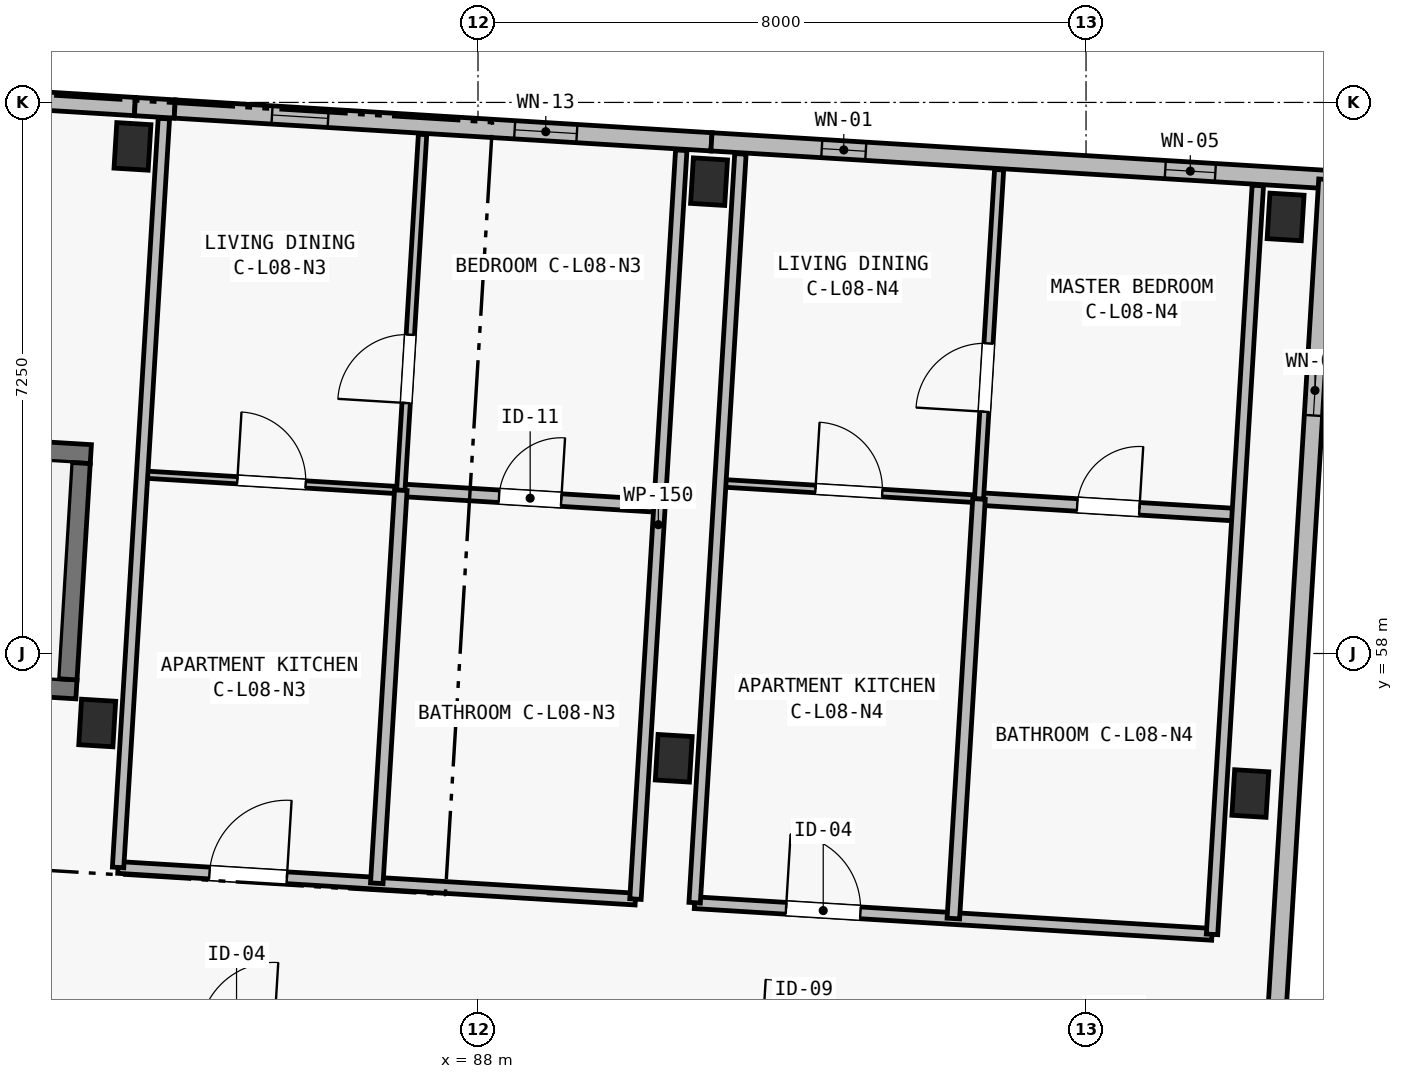
"""IFC4 building model, lengths in metres.
Left out: names, types, materials, properties, quantities, classifications, styles, units other than length and angle.
Written with IfcOpenShell. Run it as: python <this file> out.ifc"""

import sys

from ifc_helpers import new_model, si_unit, direction, frame, frame_2d, origin, origin_2d, place, context, subcontext, project, spatial, polyline, rectangle, outline, extrude, element, fill, save


model = new_model("IFC4")
c1 = context("Model", 3, precision=1e-05, world=origin(), true_north=direction((0.0, 1.0)))
c2 = subcontext(c1, "Body", "Model", "MODEL_VIEW")
j1 = project(units=[si_unit("LENGTHUNIT", "METRE"), si_unit("PLANEANGLEUNIT", "RADIAN")], contexts=[c1])
p1 = place(None, origin())
s1 = spatial("IfcSite", under=j1, at=p1, CompositionType="ELEMENT")
p2 = place(p1, origin())
s2 = spatial("IfcBuilding", under=s1, at=p2, CompositionType="ELEMENT")
p3 = place(p2, frame((0.0, 0.0, 27.9)))
s3 = spatial("IfcBuildingStorey", under=s2, at=p3, CompositionType="ELEMENT", Elevation=27.9)
for number, where, z_axis, x_axis in (
    (1, (82.99, 57.086, 0.0), (0.0, 0.0, 1.0), (0.998, -0.061, 0.0)),
    (2, (83.454, 64.672, 0.0), (0.0, 0.0, 1.0), (0.998, -0.061, 0.0)),
    (3, (90.576, 56.622, 0.0), (0.0, 0.0, 1.0), (0.998, -0.061, 0.0)),
    (4, (91.04, 64.208, 0.0), (0.0, 0.0, 1.0), (0.998, -0.061, 0.0)),
    (5, (98.162, 56.158, 0.0), (0.0, 0.0, 1.0), (0.998, -0.061, 0.0)),
    (6, (98.626, 63.744, 0.0), (0.0, 0.0, 1.0), (0.998, -0.061, 0.0)),
):
    element("IfcColumn", number, at=place(p3, frame(where, z_axis=z_axis, x_axis=x_axis)), inside=s3, PredefinedType="COLUMN", context=c2, shape_type="SweptSolid", body=[
        extrude(rectangle(XDim=0.45, YDim=0.6, at=origin_2d()), origin(), (0.0, 0.0, 1.0), 3.25),
    ])
p4 = place(p3, frame((75.919, 61.05, 0.0), z_axis=(0.0, 0.0, 1.0), x_axis=(0.998135546153, -0.061036313012, 0.0)))
e7 = element("IfcWall", 7, at=p4, inside=s3, PredefinedType="SHEAR", context=c2, shape_type="SweptSolid", body=[
    extrude(rectangle(XDim=7.0, YDim=0.25, at=frame_2d((3.5, 0.0))), origin(), (0.0, 0.0, 1.0), 3.25),
])
p5 = place(p4, frame((0.45, 0.0, 0.0)))
e8 = element("IfcOpeningElement", 8, at=p5, cuts=e7, PredefinedType="OPENING", context=c2, shape_type="SweptSolid", body=[
    extrude(rectangle(XDim=0.9, YDim=2.1, at=frame_2d((0.45, 1.05))), frame((0.0, 0.14, 0.0), z_axis=(0.0, -1.0, 0.0), x_axis=(1.0, 0.0, 0.0)), (0.0, 0.0, 1.0), 0.28),
])
p6 = place(p3, frame((75.73, 57.956, 0.0), z_axis=(0.0, 0.0, 1.0), x_axis=(0.998135546153, -0.061036313012, 0.0)))
e9 = element("IfcWall", 9, at=p6, inside=s3, PredefinedType="SHEAR", context=c2, shape_type="SweptSolid", body=[
    extrude(rectangle(XDim=7.0, YDim=0.25, at=frame_2d((3.5, 0.0))), origin(), (0.0, 0.0, 1.0), 3.25),
])
p7 = place(p6, frame((0.45, 0.0, 0.0)))
e10 = element("IfcOpeningElement", 10, at=p7, cuts=e9, PredefinedType="OPENING", context=c2, shape_type="SweptSolid", body=[
    extrude(rectangle(XDim=1.05, YDim=2.15, at=frame_2d((0.525, 1.075))), frame((0.0, 0.14, 0.0), z_axis=(0.0, -1.0, 0.0), x_axis=(1.0, 0.0, 0.0)), (0.0, 0.0, 1.0), 0.28),
])
p8 = place(p3, frame((82.599, 57.661, 0.0), z_axis=(0.0, 0.0, 1.0), x_axis=(0.06107697143, 0.998133059046, 0.0)))
e11 = element("IfcWall", 11, at=p8, inside=s3, PredefinedType="SHEAR", context=c2, shape_type="SweptSolid", body=[
    extrude(rectangle(XDim=2.85, YDim=0.25, at=frame_2d((1.425, 0.0))), origin(), (0.0, 0.0, 1.0), 3.25),
])
p9 = place(p3, frame((81.115, 65.341, 0.0), z_axis=(0.0, 0.0, 1.0), x_axis=(0.998134103342, -0.061059902923, 0.0)))
e12 = element("IfcWall", 12, at=p9, inside=s3, PredefinedType="SOLIDWALL", context=c2, shape_type="SweptSolid", body=[
    extrude(rectangle(XDim=2.375, YDim=0.24, at=frame_2d((1.188, 0.0))), origin(), (0.0, 0.0, 1.0), 3.0),
])
p10 = place(p3, frame((83.486, 65.196, 0.0), z_axis=(0.0, 0.0, 1.0), x_axis=(0.998142018096, -0.060930384143, 0.0)))
e13 = element("IfcWall", 13, at=p10, inside=s3, PredefinedType="SOLIDWALL", context=c2, shape_type="SweptSolid", body=[
    extrude(rectangle(XDim=0.525, YDim=0.24, at=frame_2d((0.262, 0.0))), origin(), (0.0, 0.0, 1.0), 3.0),
])
p11 = place(p3, frame((84.01, 65.164, 0.0), z_axis=(0.0, 0.0, 1.0), x_axis=(0.998135197798, -0.061042009435, 0.0)))
e14 = element("IfcWall", 14, at=p11, inside=s3, PredefinedType="SOLIDWALL", context=c2, shape_type="SweptSolid", body=[
    extrude(outline(polyline([(0.0, 0.0), (7.075, 0.0), (7.075, 4.861), (0.0, 6.222), (0.0, 0.0)])), frame((0.0, 0.12, 0.0), z_axis=(0.0, -1.0, 0.0), x_axis=(1.0, 0.0, 0.0)), (0.0, 0.0, 1.0), 0.24),
])
p12 = place(p11, frame((1.282, 0.0, 0.5)))
e15 = element("IfcOpeningElement", 15, at=p12, cuts=e14, PredefinedType="OPENING", context=c2, shape_type="SweptSolid", body=[
    extrude(rectangle(XDim=0.74, YDim=2.26, at=frame_2d((0.37, 1.13))), frame((0.0, 0.135, 0.0), z_axis=(0.0, -1.0, 0.0), x_axis=(1.0, 0.0, 0.0)), (0.0, 0.0, 1.0), 0.27),
])
p13 = place(p11, frame((4.481, 0.0, 0.44)))
e16 = element("IfcOpeningElement", 16, at=p13, cuts=e14, PredefinedType="OPENING", context=c2, shape_type="SweptSolid", body=[
    extrude(rectangle(XDim=0.82, YDim=2.18, at=frame_2d((0.41, 1.09))), frame((0.0, 0.135, 0.0), z_axis=(0.0, -1.0, 0.0), x_axis=(1.0, 0.0, 0.0)), (0.0, 0.0, 1.0), 0.27),
])
p14 = place(p3, frame((91.072, 64.732, 0.0), z_axis=(0.0, 0.0, 1.0), x_axis=(0.998134136914, -0.061059354132, 0.0)))
e17 = element("IfcWall", 17, at=p14, inside=s3, PredefinedType="SOLIDWALL", context=c2, shape_type="SweptSolid", body=[
    extrude(outline(polyline([(0.0, 0.0), (8.125, 0.0), (8.125, 3.298), (0.0, 4.861), (0.0, 0.0)])), frame((0.0, 0.12, 0.0), z_axis=(0.0, -1.0, 0.0), x_axis=(1.0, 0.0, 0.0)), (0.0, 0.0, 1.0), 0.24),
])
p15 = place(p14, frame((1.454, 0.0, 0.44)))
e18 = element("IfcOpeningElement", 18, at=p15, cuts=e17, PredefinedType="OPENING", context=c2, shape_type="SweptSolid", body=[
    extrude(rectangle(XDim=0.58, YDim=2.16, at=frame_2d((0.29, 1.08))), frame((0.0, 0.135, 0.0), z_axis=(0.0, -1.0, 0.0), x_axis=(1.0, 0.0, 0.0)), (0.0, 0.0, 1.0), 0.27),
])
p16 = place(p14, frame((5.982, 0.0, 0.5)))
e19 = element("IfcOpeningElement", 19, at=p16, cuts=e17, PredefinedType="OPENING", context=c2, shape_type="SweptSolid", body=[
    extrude(rectangle(XDim=0.66, YDim=2.32, at=frame_2d((0.33, 1.16))), frame((0.0, 0.135, 0.0), z_axis=(0.0, -1.0, 0.0), x_axis=(1.0, 0.0, 0.0)), (0.0, 0.0, 1.0), 0.27),
])
p17 = place(p3, frame((99.182, 64.236, 0.0), z_axis=(0.0, 0.0, 1.0), x_axis=(-0.061040833846, -0.998135269692, 0.0)))
e20 = element("IfcWall", 20, at=p17, inside=s3, PredefinedType="SOLIDWALL", context=c2, shape_type="SweptSolid", body=[
    extrude(rectangle(XDim=20.65, YDim=0.24, at=frame_2d((10.325, 0.0))), origin(), (0.0, 0.0, 1.0), 3.298),
])
p18 = place(p17, frame((2.45, 0.0, 0.45)))
e21 = element("IfcOpeningElement", 21, at=p18, cuts=e20, PredefinedType="OPENING", context=c2, shape_type="SweptSolid", body=[
    extrude(rectangle(XDim=0.66, YDim=2.32, at=frame_2d((0.33, 1.16))), frame((0.0, 0.135, 0.0), z_axis=(0.0, -1.0, 0.0), x_axis=(1.0, 0.0, 0.0)), (0.0, 0.0, 1.0), 0.27),
])
p19 = place(p17, frame((17.4, 0.0, 0.52)))
e22 = element("IfcOpeningElement", 22, at=p19, cuts=e20, PredefinedType="OPENING", context=c2, shape_type="SweptSolid", body=[
    extrude(rectangle(XDim=0.8, YDim=2.3, at=frame_2d((0.4, 1.15))), frame((0.0, 0.135, 0.0), z_axis=(0.0, -1.0, 0.0), x_axis=(1.0, 0.0, 0.0)), (0.0, 0.0, 1.0), 0.27),
])
p20 = place(p3, frame((78.415, 53.378, 0.0), z_axis=(0.0, 0.0, 1.0), x_axis=(0.998132736029, -0.061082250024, 0.0)))
e23 = element("IfcWall", 23, at=p20, inside=s3, PredefinedType="PARTITIONING", context=c2, shape_type="SweptSolid", body=[
    extrude(rectangle(XDim=4.105, YDim=0.155, at=frame_2d((2.052, 0.0))), origin(), (0.0, 0.0, 1.0), 2.97),
])
p21 = place(p20, frame((0.457, 0.0, 0.0)))
e24 = element("IfcOpeningElement", 24, at=p21, cuts=e23, PredefinedType="OPENING", context=c2, shape_type="SweptSolid", body=[
    extrude(rectangle(XDim=1.02, YDim=2.2, at=frame_2d((0.51, 1.1))), frame((0.0, 0.093, 0.0), z_axis=(0.0, -1.0, 0.0), x_axis=(1.0, 0.0, 0.0)), (0.0, 0.0, 1.0), 0.185),
])
p22 = place(p3, frame((83.265, 55.185, 0.0), z_axis=(0.0, 0.0, 1.0), x_axis=(0.998135531673, -0.061036549799, 0.0)))
e25 = element("IfcWall", 25, at=p22, inside=s3, PredefinedType="PARTITIONING", context=c2, shape_type="SweptSolid", body=[
    extrude(rectangle(XDim=6.82, YDim=0.155, at=frame_2d((3.41, 0.0))), origin(), (0.0, 0.0, 1.0), 2.97),
])
p23 = place(p22, frame((1.205, 0.0, 0.0)))
e26 = element("IfcOpeningElement", 26, at=p23, cuts=e25, PredefinedType="OPENING", context=c2, shape_type="SweptSolid", body=[
    extrude(rectangle(XDim=1.02, YDim=2.2, at=frame_2d((0.51, 1.1))), frame((0.0, 0.093, 0.0), z_axis=(0.0, -1.0, 0.0), x_axis=(1.0, 0.0, 0.0)), (0.0, 0.0, 1.0), 0.185),
])
p24 = place(p3, frame((83.581, 60.356, 0.0), z_axis=(0.0, 0.0, 1.0), x_axis=(0.998133350094, -0.061072214879, 0.0)))
e27 = element("IfcWall", 27, at=p24, inside=s3, PredefinedType="PARTITIONING", context=c2, shape_type="SweptSolid", body=[
    extrude(rectangle(XDim=3.41, YDim=0.095, at=frame_2d((1.705, 0.0))), origin(), (0.0, 0.0, 1.0), 2.97),
])
p25 = place(p24, frame((1.255, 0.0, 0.0)))
e28 = element("IfcOpeningElement", 28, at=p25, cuts=e27, PredefinedType="OPENING", context=c2, shape_type="SweptSolid", body=[
    extrude(rectangle(XDim=0.9, YDim=2.1, at=frame_2d((0.45, 1.05))), frame((0.0, 0.062, 0.0), z_axis=(0.0, -1.0, 0.0), x_axis=(1.0, 0.0, 0.0)), (0.0, 0.0, 1.0), 0.125),
])
p26 = place(p3, frame((86.984, 60.147, 0.0), z_axis=(0.0, 0.0, 1.0), x_axis=(0.99813797838, -0.060996525433, 0.0)))
e29 = element("IfcWall", 29, at=p26, inside=s3, PredefinedType="PLUMBINGWALL", context=c2, shape_type="SweptSolid", body=[
    extrude(rectangle(XDim=3.41, YDim=0.165, at=frame_2d((1.705, 0.0))), origin(), (0.0, 0.0, 1.0), 2.97),
])
p27 = place(p26, frame((1.295, 0.0, 0.0)))
e30 = element("IfcOpeningElement", 30, at=p27, cuts=e29, PredefinedType="OPENING", context=c2, shape_type="SweptSolid", body=[
    extrude(rectangle(XDim=0.82, YDim=2.08, at=frame_2d((0.41, 1.04))), frame((0.0, 0.097, 0.0), z_axis=(0.0, -1.0, 0.0), x_axis=(1.0, 0.0, 0.0)), (0.0, 0.0, 1.0), 0.195),
])
p28 = place(p3, frame((86.984, 60.147, 0.0), z_axis=(0.0, 0.0, 1.0), x_axis=(0.061059262019, 0.998134142549, 0.0)))
e31 = element("IfcWall", 31, at=p28, inside=s3, PredefinedType="PARTITIONING", context=c2, shape_type="SweptSolid", body=[
    extrude(rectangle(XDim=4.69, YDim=0.11, at=frame_2d((2.345, 0.0))), origin(), (0.0, 0.0, 1.0), 2.97),
])
p29 = place(p28, frame((1.15, 0.0, 0.0)))
e32 = element("IfcOpeningElement", 32, at=p29, cuts=e31, PredefinedType="OPENING", context=c2, shape_type="SweptSolid", body=[
    extrude(rectangle(XDim=0.9, YDim=2.1, at=frame_2d((0.45, 1.05))), frame((0.0, 0.07, 0.0), z_axis=(0.0, -1.0, 0.0), x_axis=(1.0, 0.0, 0.0)), (0.0, 0.0, 1.0), 0.14),
])
p30 = place(p3, frame((86.668, 54.977, 0.0), z_axis=(0.0, 0.0, 1.0), x_axis=(0.061037231879, 0.998135489963, 0.0)))
e33 = element("IfcWall", 33, at=p30, inside=s3, PredefinedType="PLUMBINGWALL", context=c2, shape_type="SweptSolid", body=[
    extrude(rectangle(XDim=5.18, YDim=0.165, at=frame_2d((2.59, 0.0))), origin(), (0.0, 0.0, 1.0), 2.97),
])
p31 = place(p3, frame((83.265, 55.185, 0.0), z_axis=(0.0, 0.0, 1.0), x_axis=(0.061046193261, 0.998134941923, 0.0)))
e34 = element("IfcWall", 34, at=p31, inside=s3, PredefinedType="PARTITIONING", context=c2, shape_type="SweptSolid", body=[
    extrude(rectangle(XDim=9.87, YDim=0.15, at=frame_2d((4.935, 0.0))), origin(), (0.0, 0.0, 1.0), 2.97),
])
p32 = place(p3, frame((90.072, 54.769, 0.0), z_axis=(0.0, 0.0, 1.0), x_axis=(0.061047700465, 0.998134849741, 0.0)))
e35 = element("IfcWall", 35, at=p32, inside=s3, PredefinedType="PARTITIONING", context=c2, shape_type="SweptSolid", body=[
    extrude(rectangle(XDim=9.87, YDim=0.15, at=frame_2d((4.935, 0.0))), origin(), (0.0, 0.0, 1.0), 2.97),
])
p33 = place(p3, frame((90.85, 54.721, 0.0), z_axis=(0.0, 0.0, 1.0), x_axis=(0.998135665032, -0.06103436893, 0.0)))
e36 = element("IfcWall", 36, at=p33, inside=s3, PredefinedType="PARTITIONING", context=c2, shape_type="SweptSolid", body=[
    extrude(rectangle(XDim=6.82, YDim=0.155, at=frame_2d((3.41, 0.0))), origin(), (0.0, 0.0, 1.0), 3.15),
])
p34 = place(p33, frame((1.205, 0.0, 0.0)))
e37 = element("IfcOpeningElement", 37, at=p34, cuts=e36, PredefinedType="OPENING", context=c2, shape_type="SweptSolid", body=[
    extrude(rectangle(XDim=0.98, YDim=2.15, at=frame_2d((0.49, 1.075))), frame((0.0, 0.093, 0.0), z_axis=(0.0, -1.0, 0.0), x_axis=(1.0, 0.0, 0.0)), (0.0, 0.0, 1.0), 0.185),
])
p35 = place(p3, frame((91.188, 60.241, 0.0), z_axis=(0.0, 0.0, 1.0), x_axis=(0.998133350094, -0.061072214879, 0.0)))
e38 = element("IfcWall", 38, at=p35, inside=s3, PredefinedType="PARTITIONING", context=c2, shape_type="SweptSolid", body=[
    extrude(rectangle(XDim=3.41, YDim=0.1, at=frame_2d((1.705, 0.0))), origin(), (0.0, 0.0, 1.0), 3.15),
])
p36 = place(p35, frame((1.255, 0.0, 0.0)))
e39 = element("IfcOpeningElement", 39, at=p36, cuts=e38, PredefinedType="OPENING", context=c2, shape_type="SweptSolid", body=[
    extrude(rectangle(XDim=0.88, YDim=2.1, at=frame_2d((0.44, 1.05))), frame((0.0, 0.065, 0.0), z_axis=(0.0, -1.0, 0.0), x_axis=(1.0, 0.0, 0.0)), (0.0, 0.0, 1.0), 0.13),
])
p37 = place(p3, frame((94.592, 60.033, 0.0), z_axis=(0.0, 0.0, 1.0), x_axis=(0.998133617109, -0.061067850767, 0.0)))
e40 = element("IfcWall", 40, at=p37, inside=s3, PredefinedType="PLUMBINGWALL", context=c2, shape_type="SweptSolid", body=[
    extrude(rectangle(XDim=3.41, YDim=0.165, at=frame_2d((1.705, 0.0))), origin(), (0.0, 0.0, 1.0), 3.15),
])
p38 = place(p37, frame((1.295, 0.0, 0.0)))
e41 = element("IfcOpeningElement", 41, at=p38, cuts=e40, PredefinedType="OPENING", context=c2, shape_type="SweptSolid", body=[
    extrude(rectangle(XDim=0.82, YDim=2.08, at=frame_2d((0.41, 1.04))), frame((0.0, 0.097, 0.0), z_axis=(0.0, -1.0, 0.0), x_axis=(1.0, 0.0, 0.0)), (0.0, 0.0, 1.0), 0.195),
])
p39 = place(p3, frame((94.592, 60.033, 0.0), z_axis=(0.0, 0.0, 1.0), x_axis=(0.061092906669, 0.998132083822, 0.0)))
e42 = element("IfcWall", 42, at=p39, inside=s3, PredefinedType="PARTITIONING", context=c2, shape_type="SweptSolid", body=[
    extrude(rectangle(XDim=4.34, YDim=0.12, at=frame_2d((2.17, 0.0))), origin(), (0.0, 0.0, 1.0), 3.15),
])
p40 = place(p39, frame((1.15, 0.0, 0.0)))
e43 = element("IfcOpeningElement", 43, at=p40, cuts=e42, PredefinedType="OPENING", context=c2, shape_type="SweptSolid", body=[
    extrude(rectangle(XDim=0.9, YDim=2.1, at=frame_2d((0.45, 1.05))), frame((0.0, 0.075, 0.0), z_axis=(0.0, -1.0, 0.0), x_axis=(1.0, 0.0, 0.0)), (0.0, 0.0, 1.0), 0.15),
])
p41 = place(p3, frame((94.254, 54.513, 0.0), z_axis=(0.0, 0.0, 1.0), x_axis=(0.061056206715, 0.998134329447, 0.0)))
e44 = element("IfcWall", 44, at=p41, inside=s3, PredefinedType="PLUMBINGWALL", context=c2, shape_type="SweptSolid", body=[
    extrude(rectangle(XDim=5.53, YDim=0.165, at=frame_2d((2.765, 0.0))), origin(), (0.0, 0.0, 1.0), 3.15),
])
for number, where, z_axis, x_axis in (
    (45, (90.85, 54.721, 0.0), (0.0, 0.0, 1.0), (0.061, 0.998, 0.0)),
    (46, (97.658, 54.305, 0.0), (0.0, 0.0, 1.0), (0.061, 0.998, 0.0)),
):
    element("IfcWall", number, at=place(p3, frame(where, z_axis=z_axis, x_axis=x_axis)), inside=s3, PredefinedType="PARTITIONING", context=c2, shape_type="SweptSolid", body=[
        extrude(rectangle(XDim=9.87, YDim=0.15, at=frame_2d((4.935, 0.0))), origin(), (0.0, 0.0, 1.0), 3.15),
    ])
p42 = place(p12, origin())
e47 = element("IfcWindow", 47, at=p42, inside=s3, PartitioningType="SINGLE_PANEL", PredefinedType="WINDOW", context=c2, shape_type="SweptSolid", body=[
    extrude(rectangle(XDim=0.74, YDim=2.26, at=frame_2d((0.37, 1.13))), frame((0.0, 0.03, 0.0), z_axis=(0.0, -1.0, 0.0), x_axis=(1.0, 0.0, 0.0)), (0.0, 0.0, 1.0), 0.06),
])
fill(e15, e47)
p43 = place(p13, origin())
e48 = element("IfcWindow", 48, at=p43, inside=s3, PartitioningType="SINGLE_PANEL", PredefinedType="WINDOW", context=c2, shape_type="SweptSolid", body=[
    extrude(rectangle(XDim=0.82, YDim=2.18, at=frame_2d((0.41, 1.09))), frame((0.0, 0.03, 0.0), z_axis=(0.0, -1.0, 0.0), x_axis=(1.0, 0.0, 0.0)), (0.0, 0.0, 1.0), 0.06),
])
fill(e16, e48)
p44 = place(p15, origin())
e49 = element("IfcWindow", 49, at=p44, inside=s3, PartitioningType="SINGLE_PANEL", PredefinedType="WINDOW", context=c2, shape_type="SweptSolid", body=[
    extrude(rectangle(XDim=0.58, YDim=2.16, at=frame_2d((0.29, 1.08))), frame((0.0, 0.03, 0.0), z_axis=(0.0, -1.0, 0.0), x_axis=(1.0, 0.0, 0.0)), (0.0, 0.0, 1.0), 0.06),
])
fill(e18, e49)
p45 = place(p16, origin())
e50 = element("IfcWindow", 50, at=p45, inside=s3, PartitioningType="SINGLE_PANEL", PredefinedType="WINDOW", context=c2, shape_type="SweptSolid", body=[
    extrude(rectangle(XDim=0.66, YDim=2.32, at=frame_2d((0.33, 1.16))), frame((0.0, 0.03, 0.0), z_axis=(0.0, -1.0, 0.0), x_axis=(1.0, 0.0, 0.0)), (0.0, 0.0, 1.0), 0.06),
])
fill(e19, e50)
p46 = place(p18, origin())
e51 = element("IfcWindow", 51, at=p46, inside=s3, PartitioningType="SINGLE_PANEL", PredefinedType="WINDOW", context=c2, shape_type="SweptSolid", body=[
    extrude(rectangle(XDim=0.66, YDim=2.32, at=frame_2d((0.33, 1.16))), frame((0.0, 0.03, 0.0), z_axis=(0.0, -1.0, 0.0), x_axis=(1.0, 0.0, 0.0)), (0.0, 0.0, 1.0), 0.06),
])
fill(e21, e51)
p47 = place(p23, origin())
e52 = element("IfcDoor", 52, at=p47, inside=s3, OperationType="SINGLE_SWING_RIGHT", PredefinedType="DOOR", context=c2, shape_type="SweptSolid", body=[
    extrude(rectangle(XDim=1.02, YDim=2.2, at=frame_2d((0.51, 1.1))), frame((0.0, 0.025, 0.0), z_axis=(0.0, -1.0, 0.0), x_axis=(1.0, 0.0, 0.0)), (0.0, 0.0, 1.0), 0.05),
])
fill(e26, e52)
p48 = place(p25, origin())
e53 = element("IfcDoor", 53, at=p48, inside=s3, OperationType="SINGLE_SWING_LEFT", PredefinedType="DOOR", context=c2, shape_type="SweptSolid", body=[
    extrude(rectangle(XDim=0.9, YDim=2.1, at=frame_2d((0.45, 1.05))), frame((0.0, 0.025, 0.0), z_axis=(0.0, -1.0, 0.0), x_axis=(1.0, 0.0, 0.0)), (0.0, 0.0, 1.0), 0.05),
])
fill(e28, e53)
p49 = place(p27, origin())
e54 = element("IfcDoor", 54, at=p49, inside=s3, OperationType="SINGLE_SWING_RIGHT", PredefinedType="DOOR", context=c2, shape_type="SweptSolid", body=[
    extrude(rectangle(XDim=0.82, YDim=2.08, at=frame_2d((0.41, 1.04))), frame((0.0, 0.025, 0.0), z_axis=(0.0, -1.0, 0.0), x_axis=(1.0, 0.0, 0.0)), (0.0, 0.0, 1.0), 0.05),
])
fill(e30, e54)
p50 = place(p29, origin())
e55 = element("IfcDoor", 55, at=p50, inside=s3, OperationType="SINGLE_SWING_LEFT", PredefinedType="DOOR", context=c2, shape_type="SweptSolid", body=[
    extrude(rectangle(XDim=0.9, YDim=2.1, at=frame_2d((0.45, 1.05))), frame((0.0, 0.025, 0.0), z_axis=(0.0, -1.0, 0.0), x_axis=(1.0, 0.0, 0.0)), (0.0, 0.0, 1.0), 0.05),
])
fill(e32, e55)
p51 = place(p34, origin())
e56 = element("IfcDoor", 56, at=p51, inside=s3, OperationType="SINGLE_SWING_LEFT", PredefinedType="DOOR", context=c2, shape_type="SweptSolid", body=[
    extrude(rectangle(XDim=0.98, YDim=2.15, at=frame_2d((0.49, 1.075))), frame((0.0, 0.025, 0.0), z_axis=(0.0, -1.0, 0.0), x_axis=(1.0, 0.0, 0.0)), (0.0, 0.0, 1.0), 0.05),
])
fill(e37, e56)
p52 = place(p36, origin())
e57 = element("IfcDoor", 57, at=p52, inside=s3, OperationType="SINGLE_SWING_LEFT", PredefinedType="DOOR", context=c2, shape_type="SweptSolid", body=[
    extrude(rectangle(XDim=0.88, YDim=2.1, at=frame_2d((0.44, 1.05))), frame((0.0, 0.025, 0.0), z_axis=(0.0, -1.0, 0.0), x_axis=(1.0, 0.0, 0.0)), (0.0, 0.0, 1.0), 0.05),
])
fill(e39, e57)
p53 = place(p38, origin())
e58 = element("IfcDoor", 58, at=p53, inside=s3, OperationType="SINGLE_SWING_RIGHT", PredefinedType="DOOR", context=c2, shape_type="SweptSolid", body=[
    extrude(rectangle(XDim=0.82, YDim=2.08, at=frame_2d((0.41, 1.04))), frame((0.0, 0.025, 0.0), z_axis=(0.0, -1.0, 0.0), x_axis=(1.0, 0.0, 0.0)), (0.0, 0.0, 1.0), 0.05),
])
fill(e41, e58)
p54 = place(p40, origin())
e59 = element("IfcDoor", 59, at=p54, inside=s3, OperationType="SINGLE_SWING_LEFT", PredefinedType="DOOR", context=c2, shape_type="SweptSolid", body=[
    extrude(rectangle(XDim=0.9, YDim=2.1, at=frame_2d((0.45, 1.05))), frame((0.0, 0.025, 0.0), z_axis=(0.0, -1.0, 0.0), x_axis=(1.0, 0.0, 0.0)), (0.0, 0.0, 1.0), 0.05),
])
fill(e43, e59)
save(model, sys.argv[1])
